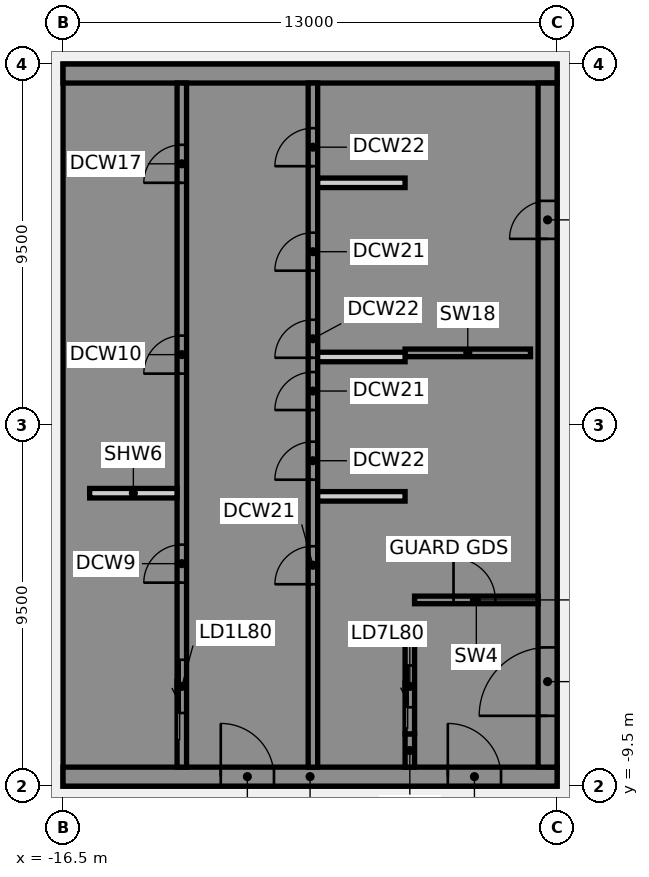
"""IFC4 building model, lengths in metres.
Left out: names, types, materials, properties, quantities, classifications, styles, units other than length and angle.
Written with IfcOpenShell. Run it as: python <this file> out.ifc"""

import sys

from ifc_helpers import new_model, si_unit, direction, frame, frame_2d, origin, place, context, subcontext, project, spatial, polyline, rectangle, outline, extrude, element, fill, save


model = new_model("IFC4")
c1 = context("Model", 3, precision=1e-05, world=origin(), true_north=direction((0.0, 1.0)))
c2 = subcontext(c1, "Body", "Model", "MODEL_VIEW")
j1 = project(units=[si_unit("LENGTHUNIT", "METRE"), si_unit("PLANEANGLEUNIT", "RADIAN")], contexts=[c1])
p1 = place(None, origin())
s1 = spatial("IfcSite", under=j1, at=p1, CompositionType="ELEMENT")
p2 = place(p1, origin())
s2 = spatial("IfcBuilding", under=s1, at=p2, CompositionType="ELEMENT")
p3 = place(p2, frame((0.0, 0.0, 325.4)))
s3 = spatial("IfcBuildingStorey", under=s2, at=p3, CompositionType="ELEMENT", Elevation=325.4)
p4 = place(p3, frame((-16.5, -9.25, 0.0), z_axis=(0.0, 0.0, 1.0), x_axis=(1.0, 0.0, 0.0)))
e1 = element("IfcWall", 1, at=p4, inside=s3, PredefinedType="SHEAR", context=c2, shape_type="SweptSolid", body=[
    extrude(rectangle(XDim=13.0, YDim=0.5, at=frame_2d((6.5, 0.0))), origin(), (0.0, 0.0, 1.0), 3.8),
])
p5 = place(p4, frame((4.15, 0.0, 0.0)))
e2 = element("IfcOpeningElement", 2, at=p5, cuts=e1, PredefinedType="OPENING", context=c2, shape_type="SweptSolid", body=[
    extrude(rectangle(XDim=1.4, YDim=2.1, at=frame_2d((0.7, 1.05))), frame((0.0, 0.26, 0.0), z_axis=(0.0, -1.0, 0.0), x_axis=(1.0, 0.0, 0.0)), (0.0, 0.0, 1.0), 0.52),
])
p6 = place(p4, frame((10.125, 0.0, 0.0)))
e3 = element("IfcOpeningElement", 3, at=p6, cuts=e1, PredefinedType="OPENING", context=c2, shape_type="SweptSolid", body=[
    extrude(rectangle(XDim=1.4, YDim=2.1, at=frame_2d((0.7, 1.05))), frame((0.0, 0.26, 0.0), z_axis=(0.0, -1.0, 0.0), x_axis=(1.0, 0.0, 0.0)), (0.0, 0.0, 1.0), 0.52),
])
p7 = place(p3, origin())
e4 = element("IfcWall", 4, at=p7, inside=s3, PredefinedType="SHEAR", context=c2, shape_type="SweptSolid", body=[
    extrude(outline(polyline([(-13.5, -8.125), (-16.0, -8.125), (-16.0, -5.625), (-13.5, -5.625), (-13.5, -5.375), (-16.0, -5.375), (-16.0, 8.125), (-13.5, 8.125), (-13.5, 9.0), (-16.0, 9.0), (-16.5, 9.0), (-16.5, -9.0), (-16.0, -9.0), (-13.5, -9.0), (-13.5, -8.125)])), origin(), (0.0, 0.0, 1.0), 3.8),
])
p8 = place(p3, frame((-16.5, 9.25, 0.0), z_axis=(0.0, 0.0, 1.0), x_axis=(1.0, 0.0, 0.0)))
e5 = element("IfcWall", 5, at=p8, inside=s3, PredefinedType="SHEAR", context=c2, shape_type="SweptSolid", body=[
    extrude(rectangle(XDim=13.0, YDim=0.5, at=frame_2d((6.5, 0.0))), origin(), (0.0, 0.0, 1.0), 3.8),
])
p9 = place(p3, origin())
e6 = element("IfcWall", 6, at=p9, inside=s3, PredefinedType="SHEAR", context=c2, shape_type="SweptSolid", body=[
    extrude(outline(polyline([(-9.8, -5.625), (-7.5, -5.625), (-7.25, -5.625), (-7.25, 9.0), (-7.5, 9.0), (-9.8, 9.0), (-9.8, 8.125), (-7.5, 8.125), (-7.5, -5.375), (-9.8, -5.375), (-9.8, -5.625)])), origin(), (0.0, 0.0, 1.0), 3.8),
])
p10 = place(p3, origin())
e7 = element("IfcWall", 7, at=p10, inside=s3, PredefinedType="SHEAR", context=c2, shape_type="SweptSolid", body=[
    extrude(outline(polyline([(-7.5, -8.125), (-9.55, -8.125), (-9.55, -5.625), (-9.8, -5.625), (-9.8, -8.125), (-9.8, -9.0), (-7.5, -9.0), (-7.5, -8.125)])), origin(), (0.0, 0.0, 1.0), 3.8),
])
p11 = place(p3, frame((-7.375, -9.0, 0.0), z_axis=(0.0, 0.0, 1.0), x_axis=(0.0, 1.0, 0.0)))
e8 = element("IfcWall", 8, at=p11, inside=s3, PredefinedType="SHEAR", context=c2, shape_type="SweptSolid", body=[
    extrude(rectangle(XDim=0.875, YDim=0.25, at=frame_2d((0.438, 0.0))), origin(), (0.0, 0.0, 1.0), 3.8),
])
p12 = place(p3, frame((-7.5, 1.9, 0.0), z_axis=(0.0, 0.0, 1.0), x_axis=(1.0, 0.0, 0.0)))
e9 = element("IfcWall", 9, at=p12, inside=s3, PredefinedType="SHEAR", context=c2, shape_type="SweptSolid", body=[
    extrude(rectangle(XDim=3.3, YDim=0.2, at=frame_2d((1.65, 0.0))), origin(), (0.0, 0.0, 1.0), 3.8),
])
p13 = place(p3, frame((-13.375, -9.0, 0.0), z_axis=(0.0, 0.0, 1.0), x_axis=(0.0, 1.0, 0.0)))
e10 = element("IfcWall", 10, at=p13, inside=s3, PredefinedType="SHEAR", context=c2, shape_type="SweptSolid", body=[
    extrude(rectangle(XDim=18.0, YDim=0.25, at=frame_2d((9.0, 0.0))), origin(), (0.0, 0.0, 1.0), 3.8),
])
p14 = place(p13, frame((1.425, 0.0, 0.0)))
e11 = element("IfcOpeningElement", 11, at=p14, cuts=e10, PredefinedType="OPENING", context=c2, shape_type="SweptSolid", body=[
    extrude(rectangle(XDim=1.4, YDim=2.1, at=frame_2d((0.7, 1.05))), frame((0.0, 0.135, 0.0), z_axis=(0.0, -1.0, 0.0), x_axis=(1.0, 0.0, 0.0)), (0.0, 0.0, 1.0), 0.27),
])
p15 = place(p13, frame((4.854, 0.0, 0.0)))
e12 = element("IfcOpeningElement", 12, at=p15, cuts=e10, PredefinedType="OPENING", context=c2, shape_type="SweptSolid", body=[
    extrude(rectangle(XDim=1.0, YDim=2.1, at=frame_2d((0.5, 1.05))), frame((0.0, 0.135, 0.0), z_axis=(0.0, -1.0, 0.0), x_axis=(1.0, 0.0, 0.0)), (0.0, 0.0, 1.0), 0.27),
])
p16 = place(p13, frame((10.354, 0.0, 0.0)))
e13 = element("IfcOpeningElement", 13, at=p16, cuts=e10, PredefinedType="OPENING", context=c2, shape_type="SweptSolid", body=[
    extrude(rectangle(XDim=1.0, YDim=2.1, at=frame_2d((0.5, 1.05))), frame((0.0, 0.135, 0.0), z_axis=(0.0, -1.0, 0.0), x_axis=(1.0, 0.0, 0.0)), (0.0, 0.0, 1.0), 0.27),
])
p17 = place(p13, frame((15.375, 0.0, 0.0)))
e14 = element("IfcOpeningElement", 14, at=p17, cuts=e10, PredefinedType="OPENING", context=c2, shape_type="SweptSolid", body=[
    extrude(rectangle(XDim=1.0, YDim=2.1, at=frame_2d((0.5, 1.05))), frame((0.0, 0.135, 0.0), z_axis=(0.0, -1.0, 0.0), x_axis=(1.0, 0.0, 0.0)), (0.0, 0.0, 1.0), 0.27),
])
p18 = place(p3, frame((-9.925, -9.0, 0.0), z_axis=(0.0, 0.0, 1.0), x_axis=(0.0, 1.0, 0.0)))
e15 = element("IfcWall", 15, at=p18, inside=s3, PredefinedType="SHEAR", context=c2, shape_type="SweptSolid", body=[
    extrude(rectangle(XDim=18.0, YDim=0.25, at=frame_2d((9.0, 0.0))), origin(), (0.0, 0.0, 1.0), 3.8),
])
p19 = place(p18, frame((4.812, 0.0, 0.0)))
e16 = element("IfcOpeningElement", 16, at=p19, cuts=e15, PredefinedType="OPENING", context=c2, shape_type="SweptSolid", body=[
    extrude(rectangle(XDim=1.0, YDim=2.1, at=frame_2d((0.5, 1.05))), frame((0.0, 0.135, 0.0), z_axis=(0.0, -1.0, 0.0), x_axis=(1.0, 0.0, 0.0)), (0.0, 0.0, 1.0), 0.27),
])
p20 = place(p18, frame((7.562, 0.0, 0.0)))
e17 = element("IfcOpeningElement", 17, at=p20, cuts=e15, PredefinedType="OPENING", context=c2, shape_type="SweptSolid", body=[
    extrude(rectangle(XDim=1.0, YDim=2.1, at=frame_2d((0.5, 1.05))), frame((0.0, 0.135, 0.0), z_axis=(0.0, -1.0, 0.0), x_axis=(1.0, 0.0, 0.0)), (0.0, 0.0, 1.0), 0.27),
])
p21 = place(p18, frame((9.396, 0.0, 0.0)))
e18 = element("IfcOpeningElement", 18, at=p21, cuts=e15, PredefinedType="OPENING", context=c2, shape_type="SweptSolid", body=[
    extrude(rectangle(XDim=1.0, YDim=2.1, at=frame_2d((0.5, 1.05))), frame((0.0, 0.135, 0.0), z_axis=(0.0, -1.0, 0.0), x_axis=(1.0, 0.0, 0.0)), (0.0, 0.0, 1.0), 0.27),
])
p22 = place(p18, frame((10.771, 0.0, 0.0)))
e19 = element("IfcOpeningElement", 19, at=p22, cuts=e15, PredefinedType="OPENING", context=c2, shape_type="SweptSolid", body=[
    extrude(rectangle(XDim=1.0, YDim=2.1, at=frame_2d((0.5, 1.05))), frame((0.0, 0.135, 0.0), z_axis=(0.0, -1.0, 0.0), x_axis=(1.0, 0.0, 0.0)), (0.0, 0.0, 1.0), 0.27),
])
p23 = place(p18, frame((13.062, 0.0, 0.0)))
e20 = element("IfcOpeningElement", 20, at=p23, cuts=e15, PredefinedType="OPENING", context=c2, shape_type="SweptSolid", body=[
    extrude(rectangle(XDim=1.0, YDim=2.1, at=frame_2d((0.5, 1.05))), frame((0.0, 0.135, 0.0), z_axis=(0.0, -1.0, 0.0), x_axis=(1.0, 0.0, 0.0)), (0.0, 0.0, 1.0), 0.27),
])
p24 = place(p18, frame((15.812, 0.0, 0.0)))
e21 = element("IfcOpeningElement", 21, at=p24, cuts=e15, PredefinedType="OPENING", context=c2, shape_type="SweptSolid", body=[
    extrude(rectangle(XDim=1.0, YDim=2.1, at=frame_2d((0.5, 1.05))), frame((0.0, 0.135, 0.0), z_axis=(0.0, -1.0, 0.0), x_axis=(1.0, 0.0, 0.0)), (0.0, 0.0, 1.0), 0.27),
])
p25 = place(p3, frame((-7.375, -8.125, 0.0), z_axis=(0.0, 0.0, 1.0), x_axis=(0.0, 1.0, 0.0)))
e22 = element("IfcWall", 22, at=p25, inside=s3, PredefinedType="SHEAR", context=c2, shape_type="SweptSolid", body=[
    extrude(rectangle(XDim=2.5, YDim=0.25, at=frame_2d((1.25, 0.0))), origin(), (0.0, 0.0, 1.0), 3.8),
])
p26 = place(p25, frame((0.7, 0.0, 0.0)))
e23 = element("IfcOpeningElement", 23, at=p26, cuts=e22, PredefinedType="OPENING", context=c2, shape_type="SweptSolid", body=[
    extrude(rectangle(XDim=1.1, YDim=2.1, at=frame_2d((0.55, 1.05))), frame((0.0, 0.135, 0.0), z_axis=(0.0, -1.0, 0.0), x_axis=(1.0, 0.0, 0.0)), (0.0, 0.0, 1.0), 0.27),
])
p27 = place(p3, frame((-3.75, -9.0, 0.0), z_axis=(0.0, 0.0, 1.0), x_axis=(0.0, 1.0, 0.0)))
e24 = element("IfcWall", 24, at=p27, inside=s3, PredefinedType="SHEAR", context=c2, shape_type="SweptSolid", body=[
    extrude(rectangle(XDim=18.0, YDim=0.5, at=frame_2d((9.0, 0.0))), origin(), (0.0, 0.0, 1.0), 3.8),
])
p28 = place(p27, frame((1.35, 0.0, 0.0)))
e25 = element("IfcOpeningElement", 25, at=p28, cuts=e24, PredefinedType="OPENING", context=c2, shape_type="SweptSolid", body=[
    extrude(rectangle(XDim=1.8, YDim=2.1, at=frame_2d((0.9, 1.05))), frame((0.0, 0.26, 0.0), z_axis=(0.0, -1.0, 0.0), x_axis=(1.0, 0.0, 0.0)), (0.0, 0.0, 1.0), 0.52),
])
p29 = place(p27, frame((13.9, 0.0, 0.0)))
e26 = element("IfcOpeningElement", 26, at=p29, cuts=e24, PredefinedType="OPENING", context=c2, shape_type="SweptSolid", body=[
    extrude(rectangle(XDim=1.0, YDim=2.1, at=frame_2d((0.5, 1.05))), frame((0.0, 0.26, 0.0), z_axis=(0.0, -1.0, 0.0), x_axis=(1.0, 0.0, 0.0)), (0.0, 0.0, 1.0), 0.52),
])
p30 = place(p3, frame((-7.25, -4.6, 0.0), z_axis=(0.0, 0.0, 1.0), x_axis=(1.0, 0.0, 0.0)))
e27 = element("IfcWall", 27, at=p30, inside=s3, PredefinedType="SHEAR", context=c2, shape_type="SweptSolid", body=[
    extrude(rectangle(XDim=3.25, YDim=0.2, at=frame_2d((1.625, 0.0))), origin(), (0.0, 0.0, 1.0), 3.8),
])
p31 = place(p30, frame((1.025, 0.0, 0.0)))
e28 = element("IfcOpeningElement", 28, at=p31, cuts=e27, PredefinedType="OPENING", context=c2, shape_type="SweptSolid", body=[
    extrude(rectangle(XDim=1.1, YDim=2.1, at=frame_2d((0.55, 1.05))), frame((0.0, 0.11, 0.0), z_axis=(0.0, -1.0, 0.0), x_axis=(1.0, 0.0, 0.0)), (0.0, 0.0, 1.0), 0.22),
])
for number, where, z_axis, x_axis in (
    (29, (-15.8, -1.792, 0.0), (0.0, 0.0, 1.0), (1.0, 0.0, 0.0)),
    (30, (-9.8, -1.875, 0.0), (0.0, 0.0, 1.0), (1.0, 0.0, 0.0)),
    (31, (-9.8, 1.792, 0.0), (0.0, 0.0, 1.0), (1.0, 0.0, 0.0)),
    (32, (-9.8, 6.375, 0.0), (0.0, 0.0, 1.0), (1.0, 0.0, 0.0)),
):
    element("IfcWall", number, at=place(p3, frame(where, z_axis=z_axis, x_axis=x_axis)), inside=s3, PredefinedType="PARTITIONING", context=c2, shape_type="SweptSolid", body=[
        extrude(rectangle(XDim=2.3, YDim=0.25, at=frame_2d((1.15, 0.0))), origin(), (0.0, 0.0, 1.0), 3.8),
    ])
p32 = place(p5, origin())
e33 = element("IfcDoor", 33, at=p32, inside=s3, OperationType="SINGLE_SWING_LEFT", PredefinedType="DOOR", context=c2, shape_type="SweptSolid", body=[
    extrude(rectangle(XDim=1.4, YDim=2.1, at=frame_2d((0.7, 1.05))), frame((0.0, 0.025, 0.0), z_axis=(0.0, -1.0, 0.0), x_axis=(1.0, 0.0, 0.0)), (0.0, 0.0, 1.0), 0.05),
])
fill(e2, e33)
p33 = place(p6, origin())
e34 = element("IfcDoor", 34, at=p33, inside=s3, OperationType="SINGLE_SWING_LEFT", PredefinedType="DOOR", context=c2, shape_type="SweptSolid", body=[
    extrude(rectangle(XDim=1.4, YDim=2.1, at=frame_2d((0.7, 1.05))), frame((0.0, 0.025, 0.0), z_axis=(0.0, -1.0, 0.0), x_axis=(1.0, 0.0, 0.0)), (0.0, 0.0, 1.0), 0.05),
])
fill(e3, e34)
p34 = place(p28, origin())
e35 = element("IfcDoor", 35, at=p34, inside=s3, OperationType="SINGLE_SWING_LEFT", PredefinedType="DOOR", context=c2, shape_type="SweptSolid", body=[
    extrude(rectangle(XDim=1.8, YDim=2.1, at=frame_2d((0.9, 1.05))), frame((0.0, 0.025, 0.0), z_axis=(0.0, -1.0, 0.0), x_axis=(1.0, 0.0, 0.0)), (0.0, 0.0, 1.0), 0.05),
])
fill(e25, e35)
p35 = place(p29, origin())
e36 = element("IfcDoor", 36, at=p35, inside=s3, OperationType="SINGLE_SWING_LEFT", PredefinedType="DOOR", context=c2, shape_type="SweptSolid", body=[
    extrude(rectangle(XDim=1.0, YDim=2.1, at=frame_2d((0.5, 1.05))), frame((0.0, 0.025, 0.0), z_axis=(0.0, -1.0, 0.0), x_axis=(1.0, 0.0, 0.0)), (0.0, 0.0, 1.0), 0.05),
])
fill(e26, e36)
p36 = place(p31, origin())
e37 = element("IfcDoor", 37, at=p36, inside=s3, OperationType="SINGLE_SWING_LEFT", PredefinedType="DOOR", context=c2, shape_type="SweptSolid", body=[
    extrude(rectangle(XDim=1.1, YDim=2.1, at=frame_2d((0.55, 1.05))), frame((0.0, 0.025, 0.0), z_axis=(0.0, -1.0, 0.0), x_axis=(1.0, 0.0, 0.0)), (0.0, 0.0, 1.0), 0.05),
])
fill(e28, e37)
p37 = place(p14, origin())
e38 = element("IfcDoor", 38, at=p37, inside=s3, OperationType="SLIDING_TO_LEFT", PredefinedType="DOOR", context=c2, shape_type="SweptSolid", body=[
    extrude(rectangle(XDim=1.4, YDim=2.1, at=frame_2d((0.7, 1.05))), frame((0.0, 0.025, 0.0), z_axis=(0.0, -1.0, 0.0), x_axis=(1.0, 0.0, 0.0)), (0.0, 0.0, 1.0), 0.05),
])
fill(e11, e38)
p38 = place(p26, origin())
e39 = element("IfcDoor", 39, at=p38, inside=s3, OperationType="SLIDING_TO_LEFT", PredefinedType="DOOR", context=c2, shape_type="SweptSolid", body=[
    extrude(rectangle(XDim=1.1, YDim=2.1, at=frame_2d((0.55, 1.05))), frame((0.0, 0.025, 0.0), z_axis=(0.0, -1.0, 0.0), x_axis=(1.0, 0.0, 0.0)), (0.0, 0.0, 1.0), 0.05),
])
fill(e23, e39)
p39 = place(p15, origin())
e40 = element("IfcDoor", 40, at=p39, inside=s3, OperationType="SINGLE_SWING_LEFT", PredefinedType="DOOR", context=c2, shape_type="SweptSolid", body=[
    extrude(rectangle(XDim=1.0, YDim=2.1, at=frame_2d((0.5, 1.05))), frame((0.0, 0.025, 0.0), z_axis=(0.0, -1.0, 0.0), x_axis=(1.0, 0.0, 0.0)), (0.0, 0.0, 1.0), 0.05),
])
fill(e12, e40)
p40 = place(p16, origin())
e41 = element("IfcDoor", 41, at=p40, inside=s3, OperationType="SINGLE_SWING_LEFT", PredefinedType="DOOR", context=c2, shape_type="SweptSolid", body=[
    extrude(rectangle(XDim=1.0, YDim=2.1, at=frame_2d((0.5, 1.05))), frame((0.0, 0.025, 0.0), z_axis=(0.0, -1.0, 0.0), x_axis=(1.0, 0.0, 0.0)), (0.0, 0.0, 1.0), 0.05),
])
fill(e13, e41)
p41 = place(p17, origin())
e42 = element("IfcDoor", 42, at=p41, inside=s3, OperationType="SINGLE_SWING_LEFT", PredefinedType="DOOR", context=c2, shape_type="SweptSolid", body=[
    extrude(rectangle(XDim=1.0, YDim=2.1, at=frame_2d((0.5, 1.05))), frame((0.0, 0.025, 0.0), z_axis=(0.0, -1.0, 0.0), x_axis=(1.0, 0.0, 0.0)), (0.0, 0.0, 1.0), 0.05),
])
fill(e14, e42)
p42 = place(p19, origin())
e43 = element("IfcDoor", 43, at=p42, inside=s3, OperationType="SINGLE_SWING_LEFT", PredefinedType="DOOR", context=c2, shape_type="SweptSolid", body=[
    extrude(rectangle(XDim=1.0, YDim=2.1, at=frame_2d((0.5, 1.05))), frame((0.0, 0.025, 0.0), z_axis=(0.0, -1.0, 0.0), x_axis=(1.0, 0.0, 0.0)), (0.0, 0.0, 1.0), 0.05),
])
fill(e16, e43)
p43 = place(p20, origin())
e44 = element("IfcDoor", 44, at=p43, inside=s3, OperationType="SINGLE_SWING_LEFT", PredefinedType="DOOR", context=c2, shape_type="SweptSolid", body=[
    extrude(rectangle(XDim=1.0, YDim=2.1, at=frame_2d((0.5, 1.05))), frame((0.0, 0.025, 0.0), z_axis=(0.0, -1.0, 0.0), x_axis=(1.0, 0.0, 0.0)), (0.0, 0.0, 1.0), 0.05),
])
fill(e17, e44)
p44 = place(p21, origin())
e45 = element("IfcDoor", 45, at=p44, inside=s3, OperationType="SINGLE_SWING_LEFT", PredefinedType="DOOR", context=c2, shape_type="SweptSolid", body=[
    extrude(rectangle(XDim=1.0, YDim=2.1, at=frame_2d((0.5, 1.05))), frame((0.0, 0.025, 0.0), z_axis=(0.0, -1.0, 0.0), x_axis=(1.0, 0.0, 0.0)), (0.0, 0.0, 1.0), 0.05),
])
fill(e18, e45)
p45 = place(p22, origin())
e46 = element("IfcDoor", 46, at=p45, inside=s3, OperationType="SINGLE_SWING_LEFT", PredefinedType="DOOR", context=c2, shape_type="SweptSolid", body=[
    extrude(rectangle(XDim=1.0, YDim=2.1, at=frame_2d((0.5, 1.05))), frame((0.0, 0.025, 0.0), z_axis=(0.0, -1.0, 0.0), x_axis=(1.0, 0.0, 0.0)), (0.0, 0.0, 1.0), 0.05),
])
fill(e19, e46)
p46 = place(p23, origin())
e47 = element("IfcDoor", 47, at=p46, inside=s3, OperationType="SINGLE_SWING_LEFT", PredefinedType="DOOR", context=c2, shape_type="SweptSolid", body=[
    extrude(rectangle(XDim=1.0, YDim=2.1, at=frame_2d((0.5, 1.05))), frame((0.0, 0.025, 0.0), z_axis=(0.0, -1.0, 0.0), x_axis=(1.0, 0.0, 0.0)), (0.0, 0.0, 1.0), 0.05),
])
fill(e20, e47)
p47 = place(p24, origin())
e48 = element("IfcDoor", 48, at=p47, inside=s3, OperationType="SINGLE_SWING_LEFT", PredefinedType="DOOR", context=c2, shape_type="SweptSolid", body=[
    extrude(rectangle(XDim=1.0, YDim=2.1, at=frame_2d((0.5, 1.05))), frame((0.0, 0.025, 0.0), z_axis=(0.0, -1.0, 0.0), x_axis=(1.0, 0.0, 0.0)), (0.0, 0.0, 1.0), 0.05),
])
fill(e21, e48)
save(model, sys.argv[1])
